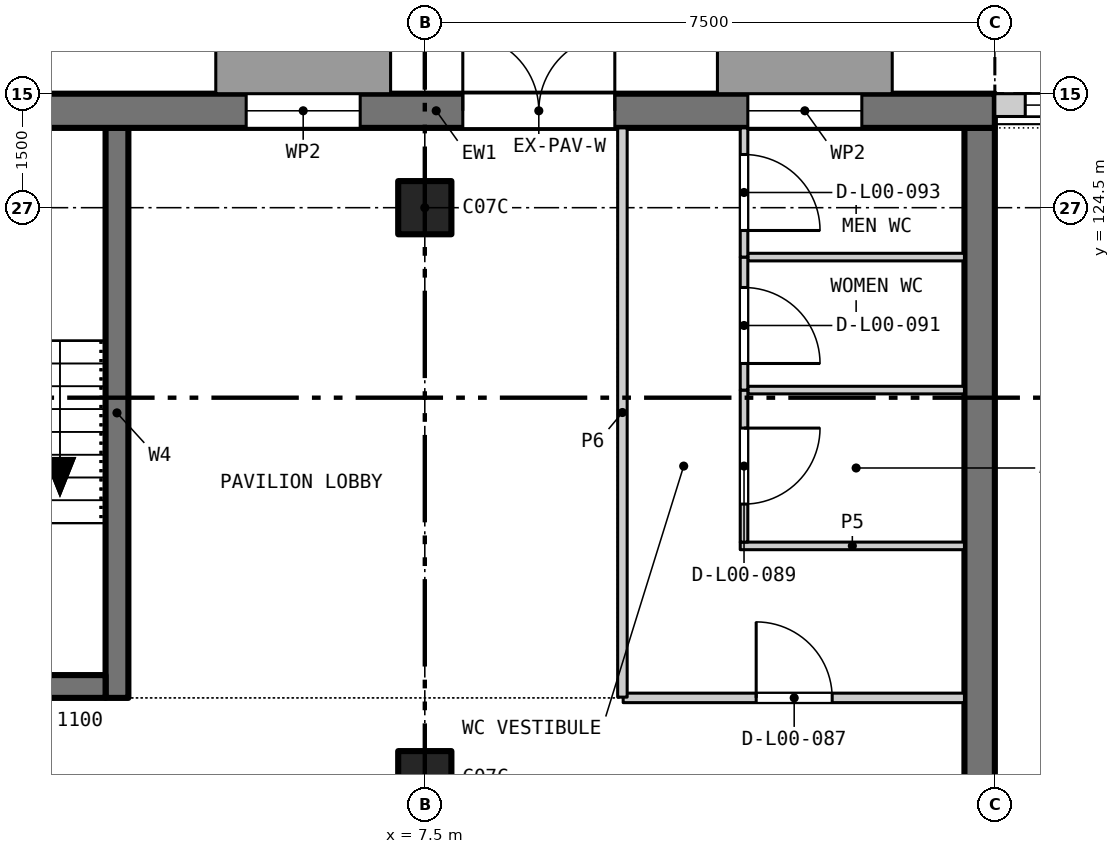
"""IFC4 building model, lengths in metres.
Left out: names, types, materials, properties, quantities, classifications, styles, units other than length and angle.
Written with IfcOpenShell. Run it as: python <this file> out.ifc"""

import sys

from ifc_helpers import new_model, si_unit, direction, frame, frame_2d, origin, origin_2d, place, context, subcontext, project, spatial, rectangle, extrude, element, fill, save


model = new_model("IFC4")
c1 = context("Model", 3, precision=1e-05, world=origin(), true_north=direction((0.0, 1.0)))
c2 = subcontext(c1, "Body", "Model", "MODEL_VIEW")
j1 = project(units=[si_unit("LENGTHUNIT", "METRE"), si_unit("PLANEANGLEUNIT", "RADIAN")], contexts=[c1])
p1 = place(None, origin())
s1 = spatial("IfcSite", under=j1, at=p1, CompositionType="ELEMENT")
p2 = place(p1, origin())
s2 = spatial("IfcBuilding", under=s1, at=p2, CompositionType="ELEMENT")
p3 = place(p2, origin())
s3 = spatial("IfcBuildingStorey", under=s2, at=p3, CompositionType="ELEMENT", Elevation=0.0)
for number, where, z_axis, x_axis in (
    (1, (7.5, 117.0, 0.0), (0.0, 0.0, 1.0), (1.0, 0.0, 0.0)),
    (2, (7.5, 124.5, 0.0), (0.0, 0.0, 1.0), (1.0, 0.0, 0.0)),
):
    element("IfcColumn", number, at=place(p3, frame(where, z_axis=z_axis, x_axis=x_axis)), inside=s3, PredefinedType="COLUMN", context=c2, shape_type="SweptSolid", body=[
        extrude(rectangle(XDim=0.7, YDim=0.7, at=origin_2d()), origin(), (0.0, 0.0, 1.0), 6.0),
    ])
p4 = place(p3, frame((14.8, 99.0, 0.0), z_axis=(0.0, 0.0, 1.0), x_axis=(0.0, 1.0, 0.0)))
e3 = element("IfcWall", 3, at=p4, inside=s3, PredefinedType="SHEAR", context=c2, shape_type="SweptSolid", body=[
    extrude(rectangle(XDim=26.55, YDim=0.4, at=frame_2d((13.275, 0.0))), origin(), (0.0, 0.0, 1.0), 6.0),
])
p5 = place(p4, frame((13.55, 0.0, 0.0)))
e4 = element("IfcOpeningElement", 4, at=p5, cuts=e3, PredefinedType="OPENING", context=c2, shape_type="SweptSolid", body=[
    extrude(rectangle(XDim=1.4, YDim=2.4, at=frame_2d((0.7, 1.2))), frame((0.0, 0.21, 0.0), z_axis=(0.0, -1.0, 0.0), x_axis=(1.0, 0.0, 0.0)), (0.0, 0.0, 1.0), 0.42),
])
p6 = place(p3, frame((3.45, 118.05, 0.0), z_axis=(0.0, 0.0, 1.0), x_axis=(0.0, 1.0, 0.0)))
e5 = element("IfcWall", 5, at=p6, inside=s3, PredefinedType="SHEAR", context=c2, shape_type="SweptSolid", body=[
    extrude(rectangle(XDim=7.5, YDim=0.3, at=frame_2d((3.75, 0.0))), origin(), (0.0, 0.0, 1.0), 6.0),
])
p7 = place(p3, frame((0.3, 118.2, 0.0), z_axis=(0.0, 0.0, 1.0), x_axis=(1.0, 0.0, 0.0)))
e6 = element("IfcWall", 6, at=p7, inside=s3, PredefinedType="SHEAR", context=c2, shape_type="SweptSolid", body=[
    extrude(rectangle(XDim=3.0, YDim=0.3, at=frame_2d((1.5, 0.0))), origin(), (0.0, 0.0, 1.0), 6.0),
])
p8 = place(p7, frame((0.95, 0.0, 0.0)))
e7 = element("IfcOpeningElement", 7, at=p8, cuts=e6, PredefinedType="OPENING", context=c2, shape_type="SweptSolid", body=[
    extrude(rectangle(XDim=1.1, YDim=2.1, at=frame_2d((0.55, 1.05))), frame((0.0, 0.16, 0.0), z_axis=(0.0, -1.0, 0.0), x_axis=(1.0, 0.0, 0.0)), (0.0, 0.0, 1.0), 0.32),
])
p9 = place(p3, frame((0.3, 125.775, 0.0), z_axis=(0.0, 0.0, 1.0), x_axis=(1.0, 0.0, 0.0)))
e8 = element("IfcWall", 8, at=p9, inside=s3, PredefinedType="SOLIDWALL", context=c2, shape_type="SweptSolid", body=[
    extrude(rectangle(XDim=14.7, YDim=0.45, at=frame_2d((7.35, 0.0))), origin(), (0.0, 0.0, 1.0), 5.7),
])
p10 = place(p9, frame((4.85, 0.0, 0.8)))
e9 = element("IfcOpeningElement", 9, at=p10, cuts=e8, PredefinedType="OPENING", context=c2, shape_type="SweptSolid", body=[
    extrude(rectangle(XDim=1.5, YDim=2.2, at=frame_2d((0.75, 1.1))), frame((0.0, 0.235, 0.0), z_axis=(0.0, -1.0, 0.0), x_axis=(1.0, 0.0, 0.0)), (0.0, 0.0, 1.0), 0.47),
])
p11 = place(p9, frame((11.45, 0.0, 0.8)))
e10 = element("IfcOpeningElement", 10, at=p11, cuts=e8, PredefinedType="OPENING", context=c2, shape_type="SweptSolid", body=[
    extrude(rectangle(XDim=1.5, YDim=2.2, at=frame_2d((0.75, 1.1))), frame((0.0, 0.235, 0.0), z_axis=(0.0, -1.0, 0.0), x_axis=(1.0, 0.0, 0.0)), (0.0, 0.0, 1.0), 0.47),
])
p12 = place(p9, frame((7.7, 0.0, 0.0)))
e11 = element("IfcOpeningElement", 11, at=p12, cuts=e8, PredefinedType="OPENING", context=c2, shape_type="SweptSolid", body=[
    extrude(rectangle(XDim=2.0, YDim=2.4, at=frame_2d((1.0, 1.2))), frame((0.0, 0.235, 0.0), z_axis=(0.0, -1.0, 0.0), x_axis=(1.0, 0.0, 0.0)), (0.0, 0.0, 1.0), 0.47),
])
p13 = place(p3, frame((15.0, 125.85, 0.0), z_axis=(0.0, 0.0, 1.0), x_axis=(1.0, 0.0, 0.0)))
e12 = element("IfcWall", 12, at=p13, inside=s3, PredefinedType="SOLIDWALL", context=c2, shape_type="SweptSolid", body=[
    extrude(rectangle(XDim=28.0, YDim=0.3, at=frame_2d((14.0, 0.0))), origin(), (0.0, 0.0, 1.0), 5.8),
])
p14 = place(p13, frame((2.3, 0.0, 0.0)))
e13 = element("IfcOpeningElement", 13, at=p14, cuts=e12, PredefinedType="OPENING", context=c2, shape_type="SweptSolid", body=[
    extrude(rectangle(XDim=2.4, YDim=2.4, at=frame_2d((1.2, 1.2))), frame((0.0, 0.16, 0.0), z_axis=(0.0, -1.0, 0.0), x_axis=(1.0, 0.0, 0.0)), (0.0, 0.0, 1.0), 0.32),
])
p15 = place(p13, frame((2.3, 0.0, 2.6)))
e14 = element("IfcOpeningElement", 14, at=p15, cuts=e12, PredefinedType="OPENING", context=c2, shape_type="SweptSolid", body=[
    extrude(rectangle(XDim=2.4, YDim=1.4, at=frame_2d((1.2, 0.7))), frame((0.0, 0.16, 0.0), z_axis=(0.0, -1.0, 0.0), x_axis=(1.0, 0.0, 0.0)), (0.0, 0.0, 1.0), 0.32),
])
p16 = place(p13, frame((9.3, 0.0, 0.0)))
e15 = element("IfcOpeningElement", 15, at=p16, cuts=e12, PredefinedType="OPENING", context=c2, shape_type="SweptSolid", body=[
    extrude(rectangle(XDim=2.4, YDim=2.4, at=frame_2d((1.2, 1.2))), frame((0.0, 0.16, 0.0), z_axis=(0.0, -1.0, 0.0), x_axis=(1.0, 0.0, 0.0)), (0.0, 0.0, 1.0), 0.32),
])
p17 = place(p13, frame((9.3, 0.0, 2.6)))
e16 = element("IfcOpeningElement", 16, at=p17, cuts=e12, PredefinedType="OPENING", context=c2, shape_type="SweptSolid", body=[
    extrude(rectangle(XDim=2.4, YDim=1.4, at=frame_2d((1.2, 0.7))), frame((0.0, 0.16, 0.0), z_axis=(0.0, -1.0, 0.0), x_axis=(1.0, 0.0, 0.0)), (0.0, 0.0, 1.0), 0.32),
])
p18 = place(p13, frame((16.3, 0.0, 0.0)))
e17 = element("IfcOpeningElement", 17, at=p18, cuts=e12, PredefinedType="OPENING", context=c2, shape_type="SweptSolid", body=[
    extrude(rectangle(XDim=2.4, YDim=2.4, at=frame_2d((1.2, 1.2))), frame((0.0, 0.16, 0.0), z_axis=(0.0, -1.0, 0.0), x_axis=(1.0, 0.0, 0.0)), (0.0, 0.0, 1.0), 0.32),
])
p19 = place(p13, frame((16.3, 0.0, 2.6)))
e18 = element("IfcOpeningElement", 18, at=p19, cuts=e12, PredefinedType="OPENING", context=c2, shape_type="SweptSolid", body=[
    extrude(rectangle(XDim=2.4, YDim=1.4, at=frame_2d((1.2, 0.7))), frame((0.0, 0.16, 0.0), z_axis=(0.0, -1.0, 0.0), x_axis=(1.0, 0.0, 0.0)), (0.0, 0.0, 1.0), 0.32),
])
p20 = place(p13, frame((23.3, 0.0, 0.0)))
e19 = element("IfcOpeningElement", 19, at=p20, cuts=e12, PredefinedType="OPENING", context=c2, shape_type="SweptSolid", body=[
    extrude(rectangle(XDim=2.4, YDim=2.4, at=frame_2d((1.2, 1.2))), frame((0.0, 0.16, 0.0), z_axis=(0.0, -1.0, 0.0), x_axis=(1.0, 0.0, 0.0)), (0.0, 0.0, 1.0), 0.32),
])
p21 = place(p13, frame((23.3, 0.0, 2.6)))
e20 = element("IfcOpeningElement", 20, at=p21, cuts=e12, PredefinedType="OPENING", context=c2, shape_type="SweptSolid", body=[
    extrude(rectangle(XDim=2.4, YDim=1.4, at=frame_2d((1.2, 0.7))), frame((0.0, 0.16, 0.0), z_axis=(0.0, -1.0, 0.0), x_axis=(1.0, 0.0, 0.0)), (0.0, 0.0, 1.0), 0.32),
])
p22 = place(p13, frame((0.4, 0.0, 0.6)))
e21 = element("IfcOpeningElement", 21, at=p22, cuts=e12, PredefinedType="OPENING", context=c2, shape_type="SweptSolid", body=[
    extrude(rectangle(XDim=1.5, YDim=3.6, at=frame_2d((0.75, 1.8))), frame((0.0, 0.16, 0.0), z_axis=(0.0, -1.0, 0.0), x_axis=(1.0, 0.0, 0.0)), (0.0, 0.0, 1.0), 0.32),
])
p23 = place(p13, frame((5.2, 0.0, 0.6)))
e22 = element("IfcOpeningElement", 22, at=p23, cuts=e12, PredefinedType="OPENING", context=c2, shape_type="SweptSolid", body=[
    extrude(rectangle(XDim=3.6, YDim=3.6, at=frame_2d((1.8, 1.8))), frame((0.0, 0.16, 0.0), z_axis=(0.0, -1.0, 0.0), x_axis=(1.0, 0.0, 0.0)), (0.0, 0.0, 1.0), 0.32),
])
p24 = place(p13, frame((12.2, 0.0, 0.6)))
e23 = element("IfcOpeningElement", 23, at=p24, cuts=e12, PredefinedType="OPENING", context=c2, shape_type="SweptSolid", body=[
    extrude(rectangle(XDim=3.6, YDim=3.6, at=frame_2d((1.8, 1.8))), frame((0.0, 0.16, 0.0), z_axis=(0.0, -1.0, 0.0), x_axis=(1.0, 0.0, 0.0)), (0.0, 0.0, 1.0), 0.32),
])
p25 = place(p13, frame((19.2, 0.0, 0.6)))
e24 = element("IfcOpeningElement", 24, at=p25, cuts=e12, PredefinedType="OPENING", context=c2, shape_type="SweptSolid", body=[
    extrude(rectangle(XDim=3.6, YDim=3.6, at=frame_2d((1.8, 1.8))), frame((0.0, 0.16, 0.0), z_axis=(0.0, -1.0, 0.0), x_axis=(1.0, 0.0, 0.0)), (0.0, 0.0, 1.0), 0.32),
])
p26 = place(p13, frame((26.1, 0.0, 0.6)))
e25 = element("IfcOpeningElement", 25, at=p26, cuts=e12, PredefinedType="OPENING", context=c2, shape_type="SweptSolid", body=[
    extrude(rectangle(XDim=1.5, YDim=3.6, at=frame_2d((0.75, 1.8))), frame((0.0, 0.16, 0.0), z_axis=(0.0, -1.0, 0.0), x_axis=(1.0, 0.0, 0.0)), (0.0, 0.0, 1.0), 0.32),
])
p27 = place(p3, frame((10.11, 118.05, 0.0), z_axis=(0.0, 0.0, 1.0), x_axis=(1.0, 0.0, 0.0)))
e26 = element("IfcWall", 26, at=p27, inside=s3, PredefinedType="PARTITIONING", context=c2, shape_type="SweptSolid", body=[
    extrude(rectangle(XDim=4.49, YDim=0.125, at=frame_2d((2.245, 0.0))), origin(), (0.0, 0.0, 1.0), 5.7),
])
p28 = place(p27, frame((1.75, 0.0, 0.0)))
e27 = element("IfcOpeningElement", 27, at=p28, cuts=e26, PredefinedType="OPENING", context=c2, shape_type="SweptSolid", body=[
    extrude(rectangle(XDim=1.0, YDim=2.1, at=frame_2d((0.5, 1.05))), frame((0.0, 0.073, 0.0), z_axis=(0.0, -1.0, 0.0), x_axis=(1.0, 0.0, 0.0)), (0.0, 0.0, 1.0), 0.145),
])
p29 = place(p3, frame((11.65, 120.05, 0.0), z_axis=(0.0, 0.0, 1.0), x_axis=(1.0, 0.0, 0.0)))
e28 = element("IfcWall", 28, at=p29, inside=s3, PredefinedType="PARTITIONING", context=c2, shape_type="SweptSolid", body=[
    extrude(rectangle(XDim=2.95, YDim=0.1, at=frame_2d((1.475, 0.0))), origin(), (0.0, 0.0, 1.0), 5.7),
])
for number, where, z_axis, x_axis in (
    (29, (11.75, 122.1, 0.0), (0.0, 0.0, 1.0), (1.0, 0.0, 0.0)),
    (30, (11.75, 123.85, 0.0), (0.0, 0.0, 1.0), (1.0, 0.0, 0.0)),
):
    element("IfcWall", number, at=place(p3, frame(where, z_axis=z_axis, x_axis=x_axis)), inside=s3, PredefinedType="PARTITIONING", context=c2, shape_type="SweptSolid", body=[
        extrude(rectangle(XDim=2.85, YDim=0.1, at=frame_2d((1.425, 0.0))), origin(), (0.0, 0.0, 1.0), 5.7),
    ])
p30 = place(p3, frame((10.1, 118.06, 0.0), z_axis=(0.0, 0.0, 1.0), x_axis=(0.0, 1.0, 0.0)))
e31 = element("IfcWall", 31, at=p30, inside=s3, PredefinedType="PARTITIONING", context=c2, shape_type="SweptSolid", body=[
    extrude(rectangle(XDim=7.49, YDim=0.125, at=frame_2d((3.745, 0.0))), origin(), (0.0, 0.0, 1.0), 5.7),
])
p31 = place(p3, frame((11.7, 120.1, 0.0), z_axis=(0.0, 0.0, 1.0), x_axis=(0.0, 1.0, 0.0)))
e32 = element("IfcWall", 32, at=p31, inside=s3, PredefinedType="PARTITIONING", context=c2, shape_type="SweptSolid", body=[
    extrude(rectangle(XDim=2.0, YDim=0.1, at=frame_2d((1.0, 0.0))), origin(), (0.0, 0.0, 1.0), 5.7),
])
p32 = place(p31, frame((0.5, 0.0, 0.0)))
e33 = element("IfcOpeningElement", 33, at=p32, cuts=e32, PredefinedType="OPENING", context=c2, shape_type="SweptSolid", body=[
    extrude(rectangle(XDim=1.0, YDim=2.1, at=frame_2d((0.5, 1.05))), frame((0.0, 0.06, 0.0), z_axis=(0.0, -1.0, 0.0), x_axis=(1.0, 0.0, 0.0)), (0.0, 0.0, 1.0), 0.12),
])
p33 = place(p3, frame((11.7, 122.1, 0.0), z_axis=(0.0, 0.0, 1.0), x_axis=(0.0, 1.0, 0.0)))
e34 = element("IfcWall", 34, at=p33, inside=s3, PredefinedType="PARTITIONING", context=c2, shape_type="SweptSolid", body=[
    extrude(rectangle(XDim=1.75, YDim=0.1, at=frame_2d((0.875, 0.0))), origin(), (0.0, 0.0, 1.0), 5.7),
])
p34 = place(p33, frame((0.35, 0.0, 0.0)))
e35 = element("IfcOpeningElement", 35, at=p34, cuts=e34, PredefinedType="OPENING", context=c2, shape_type="SweptSolid", body=[
    extrude(rectangle(XDim=1.0, YDim=2.1, at=frame_2d((0.5, 1.05))), frame((0.0, 0.06, 0.0), z_axis=(0.0, -1.0, 0.0), x_axis=(1.0, 0.0, 0.0)), (0.0, 0.0, 1.0), 0.12),
])
p35 = place(p3, frame((11.7, 123.85, 0.0), z_axis=(0.0, 0.0, 1.0), x_axis=(0.0, 1.0, 0.0)))
e36 = element("IfcWall", 36, at=p35, inside=s3, PredefinedType="PARTITIONING", context=c2, shape_type="SweptSolid", body=[
    extrude(rectangle(XDim=1.7, YDim=0.1, at=frame_2d((0.85, 0.0))), origin(), (0.0, 0.0, 1.0), 5.7),
])
p36 = place(p35, frame((0.35, 0.0, 0.0)))
e37 = element("IfcOpeningElement", 37, at=p36, cuts=e36, PredefinedType="OPENING", context=c2, shape_type="SweptSolid", body=[
    extrude(rectangle(XDim=1.0, YDim=2.1, at=frame_2d((0.5, 1.05))), frame((0.0, 0.06, 0.0), z_axis=(0.0, -1.0, 0.0), x_axis=(1.0, 0.0, 0.0)), (0.0, 0.0, 1.0), 0.12),
])
p37 = place(p10, origin())
e38 = element("IfcWindow", 38, at=p37, inside=s3, PartitioningType="SINGLE_PANEL", PredefinedType="WINDOW", context=c2, shape_type="SweptSolid", body=[
    extrude(rectangle(XDim=1.5, YDim=2.2, at=frame_2d((0.75, 1.1))), frame((0.0, -0.075, 0.0), z_axis=(0.0, -1.0, 0.0), x_axis=(1.0, 0.0, 0.0)), (0.0, 0.0, 1.0), 0.06),
])
fill(e9, e38)
p38 = place(p11, origin())
e39 = element("IfcWindow", 39, at=p38, inside=s3, PartitioningType="SINGLE_PANEL", PredefinedType="WINDOW", context=c2, shape_type="SweptSolid", body=[
    extrude(rectangle(XDim=1.5, YDim=2.2, at=frame_2d((0.75, 1.1))), frame((0.0, -0.075, 0.0), z_axis=(0.0, -1.0, 0.0), x_axis=(1.0, 0.0, 0.0)), (0.0, 0.0, 1.0), 0.06),
])
fill(e10, e39)
p39 = place(p22, origin())
e40 = element("IfcWindow", 40, at=p39, inside=s3, PartitioningType="SINGLE_PANEL", PredefinedType="WINDOW", context=c2, shape_type="SweptSolid", body=[
    extrude(rectangle(XDim=1.5, YDim=3.6, at=frame_2d((0.75, 1.8))), frame((0.0, -0.05, 0.0), z_axis=(0.0, -1.0, 0.0), x_axis=(1.0, 0.0, 0.0)), (0.0, 0.0, 1.0), 0.06),
])
fill(e21, e40)
p40 = place(p12, origin())
e41 = element("IfcDoor", 41, at=p40, inside=s3, OperationType="DOUBLE_DOOR_DOUBLE_SWING", PredefinedType="DOOR", context=c2, shape_type="SweptSolid", body=[
    extrude(rectangle(XDim=2.0, YDim=2.4, at=frame_2d((1.0, 1.2))), frame((0.0, 0.025, 0.0), z_axis=(0.0, -1.0, 0.0), x_axis=(1.0, 0.0, 0.0)), (0.0, 0.0, 1.0), 0.05),
])
fill(e11, e41)
p41 = place(p28, origin())
e42 = element("IfcDoor", 42, at=p41, inside=s3, OperationType="SINGLE_SWING_LEFT", PredefinedType="DOOR", context=c2, shape_type="SweptSolid", body=[
    extrude(rectangle(XDim=1.0, YDim=2.1, at=frame_2d((0.5, 1.05))), frame((0.0, 0.025, 0.0), z_axis=(0.0, -1.0, 0.0), x_axis=(1.0, 0.0, 0.0)), (0.0, 0.0, 1.0), 0.05),
])
fill(e27, e42)
p42 = place(p32, frame((1.0, 0.0, 0.0), z_axis=(0.0, 0.0, 1.0), x_axis=(-1.0, 0.0, 0.0)))
e43 = element("IfcDoor", 43, at=p42, inside=s3, OperationType="SINGLE_SWING_LEFT", PredefinedType="DOOR", context=c2, shape_type="SweptSolid", body=[
    extrude(rectangle(XDim=1.0, YDim=2.1, at=frame_2d((0.5, 1.05))), frame((0.0, 0.025, 0.0), z_axis=(0.0, -1.0, 0.0), x_axis=(1.0, 0.0, 0.0)), (0.0, 0.0, 1.0), 0.05),
])
fill(e33, e43)
p43 = place(p34, frame((1.0, 0.0, 0.0), z_axis=(0.0, 0.0, 1.0), x_axis=(-1.0, 0.0, 0.0)))
e44 = element("IfcDoor", 44, at=p43, inside=s3, OperationType="SINGLE_SWING_RIGHT", PredefinedType="DOOR", context=c2, shape_type="SweptSolid", body=[
    extrude(rectangle(XDim=1.0, YDim=2.1, at=frame_2d((0.5, 1.05))), frame((0.0, 0.025, 0.0), z_axis=(0.0, -1.0, 0.0), x_axis=(1.0, 0.0, 0.0)), (0.0, 0.0, 1.0), 0.05),
])
fill(e35, e44)
p44 = place(p36, frame((1.0, 0.0, 0.0), z_axis=(0.0, 0.0, 1.0), x_axis=(-1.0, 0.0, 0.0)))
e45 = element("IfcDoor", 45, at=p44, inside=s3, OperationType="SINGLE_SWING_RIGHT", PredefinedType="DOOR", context=c2, shape_type="SweptSolid", body=[
    extrude(rectangle(XDim=1.0, YDim=2.1, at=frame_2d((0.5, 1.05))), frame((0.0, 0.025, 0.0), z_axis=(0.0, -1.0, 0.0), x_axis=(1.0, 0.0, 0.0)), (0.0, 0.0, 1.0), 0.05),
])
fill(e37, e45)
save(model, sys.argv[1])
